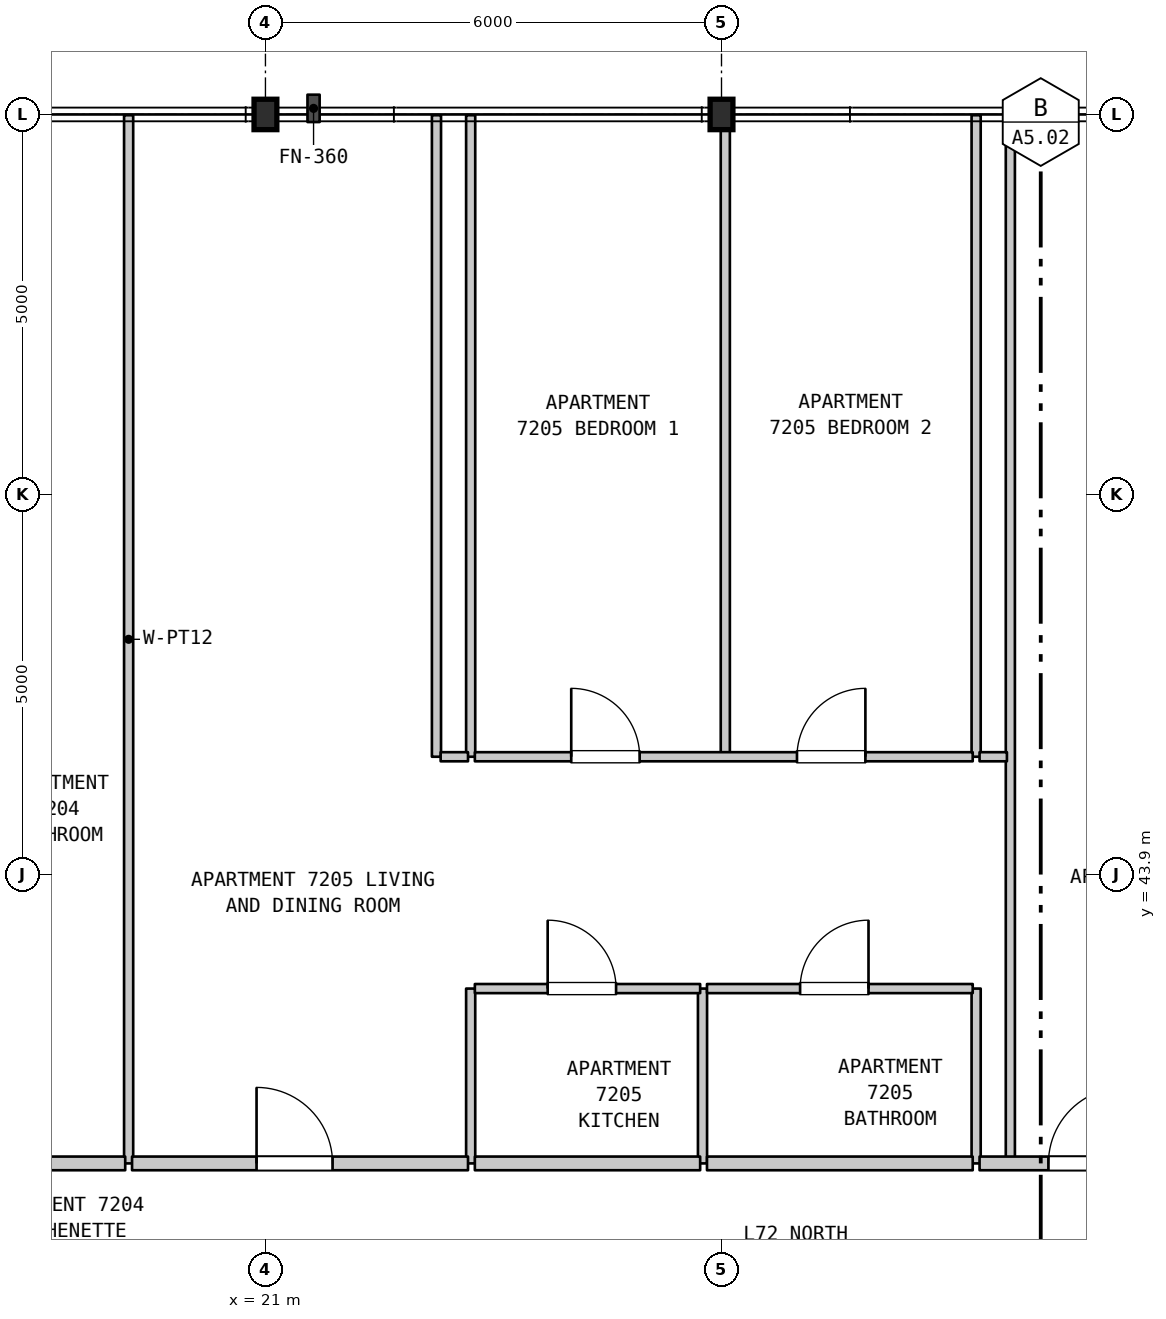
"""IFC4 building model, lengths in metres.
Left out: names, types, materials, properties, quantities, classifications, styles, units other than length and angle.
Written with IfcOpenShell. Run it as: python <this file> out.ifc"""

import sys

from ifc_helpers import new_model, si_unit, direction, frame, frame_2d, origin, origin_2d, place, context, subcontext, project, spatial, rectangle, i_section, extrude, element, fill, save


model = new_model("IFC4")
c1 = context("Model", 3, precision=1e-05, world=origin(), true_north=direction((0.0, 1.0)))
c2 = subcontext(c1, "Body", "Model", "MODEL_VIEW")
j1 = project(units=[si_unit("LENGTHUNIT", "METRE"), si_unit("PLANEANGLEUNIT", "RADIAN")], contexts=[c1])
p1 = place(None, origin())
s1 = spatial("IfcSite", under=j1, at=p1, CompositionType="ELEMENT")
p2 = place(p1, origin())
s2 = spatial("IfcBuilding", under=s1, at=p2, CompositionType="ELEMENT")
p3 = place(p2, frame((0.0, 0.0, 288.0)))
s3 = spatial("IfcBuildingStorey", under=s2, at=p3, CompositionType="ELEMENT", Elevation=288.0)
for number, where, z_axis, x_axis in (
    (1, (21.0, 53.9, 0.0), (0.0, 0.0, 1.0), (1.0, 0.0, 0.0)),
    (2, (27.0, 53.9, 0.0), (0.0, 0.0, 1.0), (1.0, 0.0, 0.0)),
):
    element("IfcColumn", number, at=place(p3, frame(where, z_axis=z_axis, x_axis=x_axis)), inside=s3, PredefinedType="COLUMN", context=c2, shape_type="SweptSolid", body=[
        extrude(i_section(OverallWidth=0.3, OverallDepth=0.4, WebThickness=0.013, FlangeThickness=0.024, FilletRadius=0.027, at=origin_2d()), origin(), (0.0, 0.0, 1.0), 3.7),
    ])
p4 = place(p3, frame((19.2, 40.1, 0.0), z_axis=(0.0, 0.0, 1.0), x_axis=(0.0, 1.0, 0.0)))
e3 = element("IfcWall", 3, at=p4, inside=s3, PredefinedType="PARTITIONING", context=c2, shape_type="SweptSolid", body=[
    extrude(rectangle(XDim=13.79, YDim=0.12, at=frame_2d((6.895, 0.0))), origin(), (0.0, 0.0, 1.0), 3.39),
])
p5 = place(p3, frame((23.25, 45.45, 0.0), z_axis=(0.0, 0.0, 1.0), x_axis=(0.0, 1.0, 0.0)))
e4 = element("IfcWall", 4, at=p5, inside=s3, PredefinedType="PARTITIONING", context=c2, shape_type="SweptSolid", body=[
    extrude(rectangle(XDim=8.44, YDim=0.12, at=frame_2d((4.22, 0.0))), origin(), (0.0, 0.0, 1.0), 3.39),
])
p6 = place(p3, frame((23.7, 40.1, 0.0), z_axis=(0.0, 0.0, 1.0), x_axis=(0.0, 1.0, 0.0)))
e5 = element("IfcWall", 5, at=p6, inside=s3, PredefinedType="PARTITIONING", context=c2, shape_type="SweptSolid", body=[
    extrude(rectangle(XDim=2.3, YDim=0.12, at=frame_2d((1.15, 0.0))), origin(), (0.0, 0.0, 1.0), 3.39),
])
p7 = place(p3, frame((23.7, 45.45, 0.0), z_axis=(0.0, 0.0, 1.0), x_axis=(0.0, 1.0, 0.0)))
e6 = element("IfcWall", 6, at=p7, inside=s3, PredefinedType="PARTITIONING", context=c2, shape_type="SweptSolid", body=[
    extrude(rectangle(XDim=8.44, YDim=0.12, at=frame_2d((4.22, 0.0))), origin(), (0.0, 0.0, 1.0), 3.39),
])
p8 = place(p3, frame((26.75, 40.1, 0.0), z_axis=(0.0, 0.0, 1.0), x_axis=(0.0, 1.0, 0.0)))
e7 = element("IfcWall", 7, at=p8, inside=s3, PredefinedType="PARTITIONING", context=c2, shape_type="SweptSolid", body=[
    extrude(rectangle(XDim=2.3, YDim=0.12, at=frame_2d((1.15, 0.0))), origin(), (0.0, 0.0, 1.0), 3.39),
])
p9 = place(p3, frame((27.05, 45.45, 0.0), z_axis=(0.0, 0.0, 1.0), x_axis=(0.0, 1.0, 0.0)))
e8 = element("IfcWall", 8, at=p9, inside=s3, PredefinedType="PARTITIONING", context=c2, shape_type="SweptSolid", body=[
    extrude(rectangle(XDim=8.44, YDim=0.12, at=frame_2d((4.22, 0.0))), origin(), (0.0, 0.0, 1.0), 3.15),
])
p10 = place(p3, frame((30.35, 40.1, 0.0), z_axis=(0.0, 0.0, 1.0), x_axis=(0.0, 1.0, 0.0)))
e9 = element("IfcWall", 9, at=p10, inside=s3, PredefinedType="PARTITIONING", context=c2, shape_type="SweptSolid", body=[
    extrude(rectangle(XDim=2.3, YDim=0.12, at=frame_2d((1.15, 0.0))), origin(), (0.0, 0.0, 1.0), 3.39),
])
p11 = place(p3, frame((30.35, 45.45, 0.0), z_axis=(0.0, 0.0, 1.0), x_axis=(0.0, 1.0, 0.0)))
e10 = element("IfcWall", 10, at=p11, inside=s3, PredefinedType="PARTITIONING", context=c2, shape_type="SweptSolid", body=[
    extrude(rectangle(XDim=8.44, YDim=0.12, at=frame_2d((4.22, 0.0))), origin(), (0.0, 0.0, 1.0), 3.39),
])
p12 = place(p3, frame((30.8, 40.1, 0.0), z_axis=(0.0, 0.0, 1.0), x_axis=(0.0, 1.0, 0.0)))
e11 = element("IfcWall", 11, at=p12, inside=s3, PredefinedType="PARTITIONING", context=c2, shape_type="SweptSolid", body=[
    extrude(rectangle(XDim=13.79, YDim=0.12, at=frame_2d((6.895, 0.0))), origin(), (0.0, 0.0, 1.0), 3.39),
])
p13 = place(p3, frame((17.295, 40.1, 0.0), z_axis=(0.0, 0.0, 1.0), x_axis=(1.0, 0.0, 0.0)))
e12 = element("IfcWall", 12, at=p13, inside=s3, PredefinedType="STANDARD", context=c2, shape_type="SweptSolid", body=[
    extrude(rectangle(XDim=1.86, YDim=0.18, at=frame_2d((0.93, 0.0))), origin(), (0.0, 0.0, 1.0), 3.39),
])
p14 = place(p3, frame((19.245, 40.1, 0.0), z_axis=(0.0, 0.0, 1.0), x_axis=(1.0, 0.0, 0.0)))
e13 = element("IfcWall", 13, at=p14, inside=s3, PredefinedType="STANDARD", context=c2, shape_type="SweptSolid", body=[
    extrude(rectangle(XDim=4.42, YDim=0.18, at=frame_2d((2.21, 0.0))), origin(), (0.0, 0.0, 1.0), 3.39),
])
p15 = place(p14, frame((1.638, 0.0, 0.0)))
e14 = element("IfcOpeningElement", 14, at=p15, cuts=e13, PredefinedType="OPENING", context=c2, shape_type="SweptSolid", body=[
    extrude(rectangle(XDim=1.0, YDim=2.15, at=frame_2d((0.5, 1.075))), frame((0.0, 0.1, 0.0), z_axis=(0.0, -1.0, 0.0), x_axis=(1.0, 0.0, 0.0)), (0.0, 0.0, 1.0), 0.2),
])
p16 = place(p3, frame((23.755, 40.1, 0.0), z_axis=(0.0, 0.0, 1.0), x_axis=(1.0, 0.0, 0.0)))
e15 = element("IfcWall", 15, at=p16, inside=s3, PredefinedType="STANDARD", context=c2, shape_type="SweptSolid", body=[
    extrude(rectangle(XDim=2.964, YDim=0.18, at=frame_2d((1.482, 0.0))), origin(), (0.0, 0.0, 1.0), 3.39),
])
p17 = place(p3, frame((26.809, 40.1, 0.0), z_axis=(0.0, 0.0, 1.0), x_axis=(1.0, 0.0, 0.0)))
e16 = element("IfcWall", 16, at=p17, inside=s3, PredefinedType="STANDARD", context=c2, shape_type="SweptSolid", body=[
    extrude(rectangle(XDim=3.496, YDim=0.18, at=frame_2d((1.748, 0.0))), origin(), (0.0, 0.0, 1.0), 3.39),
])
p18 = place(p3, frame((30.395, 40.1, 0.0), z_axis=(0.0, 0.0, 1.0), x_axis=(1.0, 0.0, 0.0)))
e17 = element("IfcWall", 17, at=p18, inside=s3, PredefinedType="STANDARD", context=c2, shape_type="SweptSolid", body=[
    extrude(rectangle(XDim=2.545, YDim=0.18, at=frame_2d((1.272, 0.0))), origin(), (0.0, 0.0, 1.0), 3.39),
])
p19 = place(p18, frame((0.906, 0.0, 0.0)))
e18 = element("IfcOpeningElement", 18, at=p19, cuts=e17, PredefinedType="OPENING", context=c2, shape_type="SweptSolid", body=[
    extrude(rectangle(XDim=1.0, YDim=2.15, at=frame_2d((0.5, 1.075))), frame((0.0, 0.1, 0.0), z_axis=(0.0, -1.0, 0.0), x_axis=(1.0, 0.0, 0.0)), (0.0, 0.0, 1.0), 0.2),
])
p20 = place(p3, frame((23.755, 42.4, 0.0), z_axis=(0.0, 0.0, 1.0), x_axis=(1.0, 0.0, 0.0)))
e19 = element("IfcWall", 19, at=p20, inside=s3, PredefinedType="PARTITIONING", context=c2, shape_type="SweptSolid", body=[
    extrude(rectangle(XDim=2.964, YDim=0.12, at=frame_2d((1.482, 0.0))), origin(), (0.0, 0.0, 1.0), 3.39),
])
p21 = place(p20, frame((0.958, 0.0, 0.0)))
e20 = element("IfcOpeningElement", 20, at=p21, cuts=e19, PredefinedType="OPENING", context=c2, shape_type="SweptSolid", body=[
    extrude(rectangle(XDim=0.9, YDim=2.15, at=frame_2d((0.45, 1.075))), frame((0.0, 0.07, 0.0), z_axis=(0.0, -1.0, 0.0), x_axis=(1.0, 0.0, 0.0)), (0.0, 0.0, 1.0), 0.14),
])
p22 = place(p3, frame((26.809, 42.4, 0.0), z_axis=(0.0, 0.0, 1.0), x_axis=(1.0, 0.0, 0.0)))
e21 = element("IfcWall", 21, at=p22, inside=s3, PredefinedType="PARTITIONING", context=c2, shape_type="SweptSolid", body=[
    extrude(rectangle(XDim=3.496, YDim=0.12, at=frame_2d((1.748, 0.0))), origin(), (0.0, 0.0, 1.0), 3.39),
])
p23 = place(p22, frame((1.225, 0.0, 0.0)))
e22 = element("IfcOpeningElement", 22, at=p23, cuts=e21, PredefinedType="OPENING", context=c2, shape_type="SweptSolid", body=[
    extrude(rectangle(XDim=0.9, YDim=2.1, at=frame_2d((0.45, 1.05))), frame((0.0, 0.07, 0.0), z_axis=(0.0, -1.0, 0.0), x_axis=(1.0, 0.0, 0.0)), (0.0, 0.0, 1.0), 0.14),
])
p24 = place(p3, frame((23.305, 45.45, 0.0), z_axis=(0.0, 0.0, 1.0), x_axis=(1.0, 0.0, 0.0)))
e23 = element("IfcWall", 23, at=p24, inside=s3, PredefinedType="PARTITIONING", context=c2, shape_type="SweptSolid", body=[
    extrude(rectangle(XDim=0.36, YDim=0.12, at=frame_2d((0.18, 0.0))), origin(), (0.0, 0.0, 1.0), 3.39),
])
p25 = place(p3, frame((23.755, 45.45, 0.0), z_axis=(0.0, 0.0, 1.0), x_axis=(1.0, 0.0, 0.0)))
e24 = element("IfcWall", 24, at=p25, inside=s3, PredefinedType="PARTITIONING", context=c2, shape_type="SweptSolid", body=[
    extrude(rectangle(XDim=6.55, YDim=0.12, at=frame_2d((3.275, 0.0))), origin(), (0.0, 0.0, 1.0), 3.39),
])
p26 = place(p25, frame((1.268, 0.0, 0.0)))
e25 = element("IfcOpeningElement", 25, at=p26, cuts=e24, PredefinedType="OPENING", context=c2, shape_type="SweptSolid", body=[
    extrude(rectangle(XDim=0.9, YDim=2.15, at=frame_2d((0.45, 1.075))), frame((0.0, 0.07, 0.0), z_axis=(0.0, -1.0, 0.0), x_axis=(1.0, 0.0, 0.0)), (0.0, 0.0, 1.0), 0.14),
])
p27 = place(p25, frame((4.238, 0.0, 0.0)))
e26 = element("IfcOpeningElement", 26, at=p27, cuts=e24, PredefinedType="OPENING", context=c2, shape_type="SweptSolid", body=[
    extrude(rectangle(XDim=0.9, YDim=2.15, at=frame_2d((0.45, 1.075))), frame((0.0, 0.07, 0.0), z_axis=(0.0, -1.0, 0.0), x_axis=(1.0, 0.0, 0.0)), (0.0, 0.0, 1.0), 0.14),
])
p28 = place(p3, frame((30.395, 45.45, 0.0), z_axis=(0.0, 0.0, 1.0), x_axis=(1.0, 0.0, 0.0)))
e27 = element("IfcWall", 27, at=p28, inside=s3, PredefinedType="PARTITIONING", context=c2, shape_type="SweptSolid", body=[
    extrude(rectangle(XDim=0.36, YDim=0.12, at=frame_2d((0.18, 0.0))), origin(), (0.0, 0.0, 1.0), 3.39),
])
p29 = place(p15, origin())
e28 = element("IfcDoor", 28, at=p29, inside=s3, OperationType="SINGLE_SWING_LEFT", PredefinedType="DOOR", context=c2, shape_type="SweptSolid", body=[
    extrude(rectangle(XDim=1.0, YDim=2.15, at=frame_2d((0.5, 1.075))), frame((0.0, 0.025, 0.0), z_axis=(0.0, -1.0, 0.0), x_axis=(1.0, 0.0, 0.0)), (0.0, 0.0, 1.0), 0.05),
])
fill(e14, e28)
p30 = place(p19, origin())
e29 = element("IfcDoor", 29, at=p30, inside=s3, OperationType="SINGLE_SWING_RIGHT", PredefinedType="DOOR", context=c2, shape_type="SweptSolid", body=[
    extrude(rectangle(XDim=1.0, YDim=2.15, at=frame_2d((0.5, 1.075))), frame((0.0, 0.025, 0.0), z_axis=(0.0, -1.0, 0.0), x_axis=(1.0, 0.0, 0.0)), (0.0, 0.0, 1.0), 0.05),
])
fill(e18, e29)
p31 = place(p21, origin())
e30 = element("IfcDoor", 30, at=p31, inside=s3, OperationType="SINGLE_SWING_LEFT", PredefinedType="DOOR", context=c2, shape_type="SweptSolid", body=[
    extrude(rectangle(XDim=0.9, YDim=2.15, at=frame_2d((0.45, 1.075))), frame((0.0, 0.025, 0.0), z_axis=(0.0, -1.0, 0.0), x_axis=(1.0, 0.0, 0.0)), (0.0, 0.0, 1.0), 0.05),
])
fill(e20, e30)
p32 = place(p23, origin())
e31 = element("IfcDoor", 31, at=p32, inside=s3, OperationType="SINGLE_SWING_RIGHT", PredefinedType="DOOR", context=c2, shape_type="SweptSolid", body=[
    extrude(rectangle(XDim=0.9, YDim=2.1, at=frame_2d((0.45, 1.05))), frame((0.0, 0.025, 0.0), z_axis=(0.0, -1.0, 0.0), x_axis=(1.0, 0.0, 0.0)), (0.0, 0.0, 1.0), 0.05),
])
fill(e22, e31)
p33 = place(p26, origin())
e32 = element("IfcDoor", 32, at=p33, inside=s3, OperationType="SINGLE_SWING_LEFT", PredefinedType="DOOR", context=c2, shape_type="SweptSolid", body=[
    extrude(rectangle(XDim=0.9, YDim=2.15, at=frame_2d((0.45, 1.075))), frame((0.0, 0.025, 0.0), z_axis=(0.0, -1.0, 0.0), x_axis=(1.0, 0.0, 0.0)), (0.0, 0.0, 1.0), 0.05),
])
fill(e25, e32)
p34 = place(p27, origin())
e33 = element("IfcDoor", 33, at=p34, inside=s3, OperationType="SINGLE_SWING_RIGHT", PredefinedType="DOOR", context=c2, shape_type="SweptSolid", body=[
    extrude(rectangle(XDim=0.9, YDim=2.15, at=frame_2d((0.45, 1.075))), frame((0.0, 0.025, 0.0), z_axis=(0.0, -1.0, 0.0), x_axis=(1.0, 0.0, 0.0)), (0.0, 0.0, 1.0), 0.05),
])
fill(e26, e33)
save(model, sys.argv[1])
